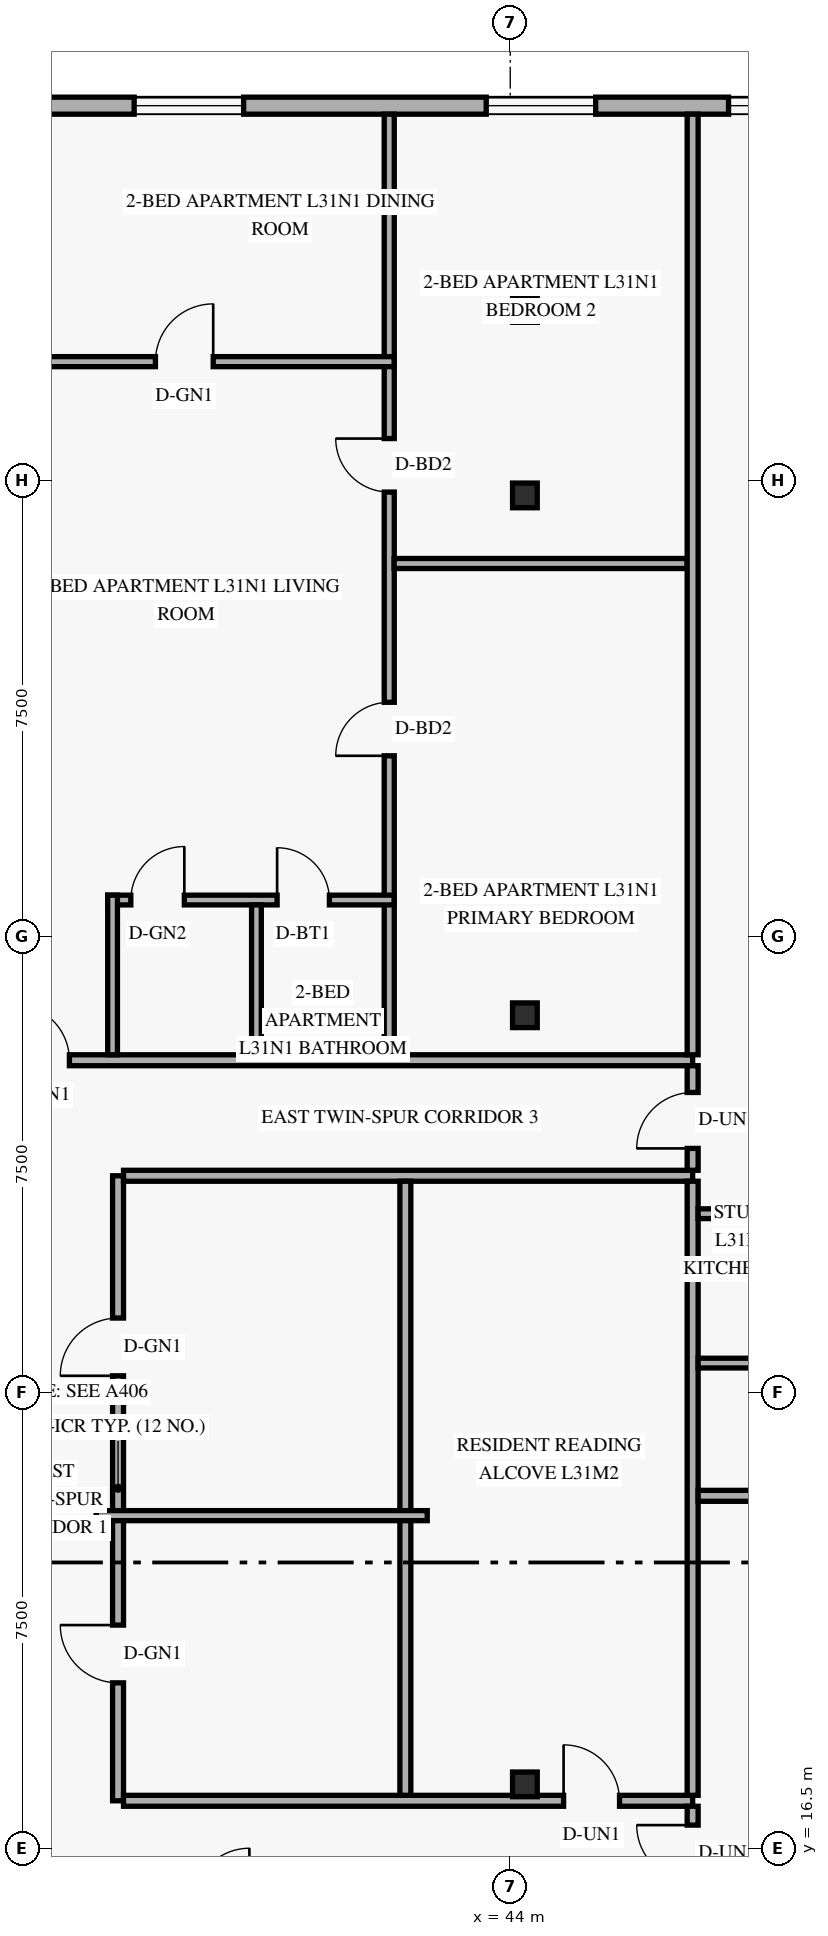
"""IFC4 building model, lengths in metres.
Left out: names, types, materials, properties, quantities, classifications, styles, units other than length and angle.
Written with IfcOpenShell. Run it as: python <this file> out.ifc"""

import sys

from ifc_helpers import new_model, si_unit, direction, frame, frame_2d, origin, origin_2d, place, context, subcontext, project, spatial, rectangle, hollow_rectangle, extrude, element, fill, save


model = new_model("IFC4")
c1 = context("Model", 3, precision=1e-05, world=origin(), true_north=direction((0.0, 1.0)))
c2 = subcontext(c1, "Body", "Model", "MODEL_VIEW")
j1 = project(units=[si_unit("LENGTHUNIT", "METRE"), si_unit("PLANEANGLEUNIT", "RADIAN")], contexts=[c1])
p1 = place(None, origin())
s1 = spatial("IfcSite", under=j1, at=p1, CompositionType="ELEMENT")
p2 = place(p1, origin())
s2 = spatial("IfcBuilding", under=s1, at=p2, CompositionType="ELEMENT")
p3 = place(p2, frame((0.0, 0.0, 121.2)))
s3 = spatial("IfcBuildingStorey", under=s2, at=p3, CompositionType="ELEMENT", Elevation=121.2)
for number, where, z_axis, x_axis in (
    (1, (44.178, 17.55, 0.0), (0.035, 0.0, 0.999), (0.0, 1.0, 0.0)),
    (2, (44.178, 30.2, 0.0), (0.035, 0.0, 0.999), (0.0, 1.0, 0.0)),
    (3, (44.178, 38.75, 0.0), (0.035, 0.0, 0.999), (0.0, 1.0, 0.0)),
    (4, (44.178, 41.8, 0.0), (0.035, 0.0, 0.999), (0.0, 1.0, 0.0)),
):
    element("IfcColumn", number, at=place(p3, frame(where, z_axis=z_axis, x_axis=x_axis)), inside=s3, PredefinedType="COLUMN", context=c2, shape_type="SweptSolid", body=[
        extrude(hollow_rectangle(XDim=0.406, YDim=0.406, WallThickness=0.016, at=origin_2d()), origin(), (0.0, 0.0, 1.0), 3.602),
    ])
p4 = place(p3, frame((49.98, 45.16, 0.0), z_axis=(0.0, 0.0, 1.0), x_axis=(-1.0, 0.0, 0.0)))
e5 = element("IfcWall", 5, at=p4, inside=s3, PredefinedType="SOLIDWALL", context=c2, shape_type="SweptSolid", body=[
    extrude(rectangle(XDim=36.56, YDim=0.28, at=frame_2d((18.28, 0.0))), origin(), (0.0, 0.0, 1.0), 3.36),
])
p5 = place(p4, frame((31.545, 0.0, 0.85)))
e6 = element("IfcOpeningElement", 6, at=p5, cuts=e5, PredefinedType="OPENING", context=c2, shape_type="SweptSolid", body=[
    extrude(rectangle(XDim=1.8, YDim=1.6, at=frame_2d((0.9, 0.8))), frame((0.0, 0.15, 0.0), z_axis=(0.0, -1.0, 0.0), x_axis=(1.0, 0.0, 0.0)), (0.0, 0.0, 1.0), 0.3),
])
p6 = place(p4, frame((23.48, 0.0, 0.85)))
e7 = element("IfcOpeningElement", 7, at=p6, cuts=e5, PredefinedType="OPENING", context=c2, shape_type="SweptSolid", body=[
    extrude(rectangle(XDim=1.8, YDim=1.6, at=frame_2d((0.9, 0.8))), frame((0.0, 0.15, 0.0), z_axis=(0.0, -1.0, 0.0), x_axis=(1.0, 0.0, 0.0)), (0.0, 0.0, 1.0), 0.3),
])
p7 = place(p4, frame((16.595, 0.0, 0.85)))
e8 = element("IfcOpeningElement", 8, at=p7, cuts=e5, PredefinedType="OPENING", context=c2, shape_type="SweptSolid", body=[
    extrude(rectangle(XDim=1.8, YDim=1.6, at=frame_2d((0.9, 0.8))), frame((0.0, 0.15, 0.0), z_axis=(0.0, -1.0, 0.0), x_axis=(1.0, 0.0, 0.0)), (0.0, 0.0, 1.0), 0.3),
])
p8 = place(p4, frame((10.365, 0.0, 0.85)))
e9 = element("IfcOpeningElement", 9, at=p8, cuts=e5, PredefinedType="OPENING", context=c2, shape_type="SweptSolid", body=[
    extrude(rectangle(XDim=1.8, YDim=1.6, at=frame_2d((0.9, 0.8))), frame((0.0, 0.15, 0.0), z_axis=(0.0, -1.0, 0.0), x_axis=(1.0, 0.0, 0.0)), (0.0, 0.0, 1.0), 0.3),
])
p9 = place(p4, frame((4.575, 0.0, 0.85)))
e10 = element("IfcOpeningElement", 10, at=p9, cuts=e5, PredefinedType="OPENING", context=c2, shape_type="SweptSolid", body=[
    extrude(rectangle(XDim=1.8, YDim=1.6, at=frame_2d((0.9, 0.8))), frame((0.0, 0.15, 0.0), z_axis=(0.0, -1.0, 0.0), x_axis=(1.0, 0.0, 0.0)), (0.0, 0.0, 1.0), 0.3),
])
p10 = place(p4, frame((0.59, 0.0, 0.85)))
e11 = element("IfcOpeningElement", 11, at=p10, cuts=e5, PredefinedType="OPENING", context=c2, shape_type="SweptSolid", body=[
    extrude(rectangle(XDim=1.8, YDim=1.6, at=frame_2d((0.9, 0.8))), frame((0.0, 0.15, 0.0), z_axis=(0.0, -1.0, 0.0), x_axis=(1.0, 0.0, 0.0)), (0.0, 0.0, 1.0), 0.3),
])
p11 = place(p3, frame((37.55, 17.28, 0.0), z_axis=(0.0, 0.0, 1.0), x_axis=(0.0, 1.0, 0.0)))
e12 = element("IfcWall", 12, at=p11, inside=s3, PredefinedType="STANDARD", context=c2, shape_type="SweptSolid", body=[
    extrude(rectangle(XDim=10.28, YDim=0.18, at=frame_2d((5.14, 0.0))), origin(), (0.0, 0.0, 1.0), 2.731),
])
p12 = place(p11, frame((1.94, 0.0, 0.0)))
e13 = element("IfcOpeningElement", 13, at=p12, cuts=e12, PredefinedType="OPENING", context=c2, shape_type="SweptSolid", body=[
    extrude(rectangle(XDim=0.95, YDim=2.15, at=frame_2d((0.475, 1.075))), frame((0.0, 0.1, 0.0), z_axis=(0.0, -1.0, 0.0), x_axis=(1.0, 0.0, 0.0)), (0.0, 0.0, 1.0), 0.2),
])
p13 = place(p11, frame((6.99, 0.0, 0.0)))
e14 = element("IfcOpeningElement", 14, at=p13, cuts=e12, PredefinedType="OPENING", context=c2, shape_type="SweptSolid", body=[
    extrude(rectangle(XDim=0.95, YDim=2.15, at=frame_2d((0.475, 1.075))), frame((0.0, 0.1, 0.0), z_axis=(0.0, -1.0, 0.0), x_axis=(1.0, 0.0, 0.0)), (0.0, 0.0, 1.0), 0.2),
])
p14 = place(p3, frame((37.64, 17.28, 0.0), z_axis=(0.0, 0.0, 1.0), x_axis=(1.0, 0.0, 0.0)))
e15 = element("IfcWall", 15, at=p14, inside=s3, PredefinedType="STANDARD", context=c2, shape_type="SweptSolid", body=[
    extrude(rectangle(XDim=9.36, YDim=0.18, at=frame_2d((4.68, 0.0))), origin(), (0.0, 0.0, 1.0), 2.731),
])
p15 = place(p14, frame((7.238, 0.0, 0.0)))
e16 = element("IfcOpeningElement", 16, at=p15, cuts=e15, PredefinedType="OPENING", context=c2, shape_type="SweptSolid", body=[
    extrude(rectangle(XDim=0.92, YDim=2.15, at=frame_2d((0.46, 1.075))), frame((0.0, 0.1, 0.0), z_axis=(0.0, -1.0, 0.0), x_axis=(1.0, 0.0, 0.0)), (0.0, 0.0, 1.0), 0.2),
])
p16 = place(p3, frame((37.64, 27.56, 0.0), z_axis=(0.0, 0.0, 1.0), x_axis=(1.0, 0.0, 0.0)))
e17 = element("IfcWall", 17, at=p16, inside=s3, PredefinedType="STANDARD", context=c2, shape_type="SweptSolid", body=[
    extrude(rectangle(XDim=9.36, YDim=0.18, at=frame_2d((4.68, 0.0))), origin(), (0.0, 0.0, 1.0), 2.731),
])
p17 = place(p3, frame((35.51, 29.46, 0.0), z_axis=(0.0, 0.0, 1.0), x_axis=(1.0, 0.0, 0.0)))
e18 = element("IfcWall", 18, at=p17, inside=s3, PredefinedType="STANDARD", context=c2, shape_type="SweptSolid", body=[
    extrude(rectangle(XDim=11.49, YDim=0.18, at=frame_2d((5.745, 0.0))), origin(), (0.0, 0.0, 1.0), 2.731),
])
p18 = place(p17, frame((0.32, 0.0, 0.0)))
e19 = element("IfcOpeningElement", 19, at=p18, cuts=e18, PredefinedType="OPENING", context=c2, shape_type="SweptSolid", body=[
    extrude(rectangle(XDim=0.92, YDim=2.15, at=frame_2d((0.46, 1.075))), frame((0.0, 0.1, 0.0), z_axis=(0.0, -1.0, 0.0), x_axis=(1.0, 0.0, 0.0)), (0.0, 0.0, 1.0), 0.2),
])
p19 = place(p3, frame((42.01, 29.55, 0.0), z_axis=(0.0, 0.0, 1.0), x_axis=(0.0, 1.0, 0.0)))
e20 = element("IfcWall", 20, at=p19, inside=s3, PredefinedType="PARTITIONING", context=c2, shape_type="SweptSolid", body=[
    extrude(rectangle(XDim=15.47, YDim=0.165, at=frame_2d((7.735, 0.0))), origin(), (0.0, 0.0, 1.0), 2.731),
])
p20 = place(p19, frame((4.917, 0.0, 0.0)))
e21 = element("IfcOpeningElement", 21, at=p20, cuts=e20, PredefinedType="OPENING", context=c2, shape_type="SweptSolid", body=[
    extrude(rectangle(XDim=0.88, YDim=2.14, at=frame_2d((0.44, 1.07))), frame((0.0, 0.093, 0.0), z_axis=(0.0, -1.0, 0.0), x_axis=(1.0, 0.0, 0.0)), (0.0, 0.0, 1.0), 0.185),
])
p21 = place(p19, frame((9.255, 0.0, 0.0)))
e22 = element("IfcOpeningElement", 22, at=p21, cuts=e20, PredefinedType="OPENING", context=c2, shape_type="SweptSolid", body=[
    extrude(rectangle(XDim=0.88, YDim=2.14, at=frame_2d((0.44, 1.07))), frame((0.0, 0.093, 0.0), z_axis=(0.0, -1.0, 0.0), x_axis=(1.0, 0.0, 0.0)), (0.0, 0.0, 1.0), 0.185),
])
p22 = place(p3, frame((37.38, 32.095, 0.0), z_axis=(0.0, 0.0, 1.0), x_axis=(1.0, 0.0, 0.0)))
e23 = element("IfcWall", 23, at=p22, inside=s3, PredefinedType="PLUMBINGWALL", context=c2, shape_type="SweptSolid", body=[
    extrude(rectangle(XDim=4.71, YDim=0.16, at=frame_2d((2.355, 0.0))), origin(), (0.0, 0.0, 1.0), 3.36),
])
p23 = place(p22, frame((0.38, 0.0, 0.0)))
e24 = element("IfcOpeningElement", 24, at=p23, cuts=e23, PredefinedType="OPENING", context=c2, shape_type="SweptSolid", body=[
    extrude(rectangle(XDim=0.88, YDim=2.12, at=frame_2d((0.44, 1.06))), frame((0.0, 0.09, 0.0), z_axis=(0.0, -1.0, 0.0), x_axis=(1.0, 0.0, 0.0)), (0.0, 0.0, 1.0), 0.18),
])
p24 = place(p22, frame((2.786, 0.0, 0.0)))
e25 = element("IfcOpeningElement", 25, at=p24, cuts=e23, PredefinedType="OPENING", context=c2, shape_type="SweptSolid", body=[
    extrude(rectangle(XDim=0.86, YDim=2.12, at=frame_2d((0.43, 1.06))), frame((0.0, 0.09, 0.0), z_axis=(0.0, -1.0, 0.0), x_axis=(1.0, 0.0, 0.0)), (0.0, 0.0, 1.0), 0.18),
])
p25 = place(p3, frame((37.46, 29.55, 0.0), z_axis=(0.0, 0.0, 1.0), x_axis=(0.0, 1.0, 0.0)))
e26 = element("IfcWall", 26, at=p25, inside=s3, PredefinedType="PLUMBINGWALL", context=c2, shape_type="SweptSolid", body=[
    extrude(rectangle(XDim=2.625, YDim=0.16, at=frame_2d((1.312, 0.0))), origin(), (0.0, 0.0, 1.0), 2.731),
])
p26 = place(p3, frame((39.826, 29.55, 0.0), z_axis=(0.0, 0.0, 1.0), x_axis=(0.0, 1.0, 0.0)))
e27 = element("IfcWall", 27, at=p26, inside=s3, PredefinedType="PLUMBINGWALL", context=c2, shape_type="SweptSolid", body=[
    extrude(rectangle(XDim=2.465, YDim=0.16, at=frame_2d((1.232, 0.0))), origin(), (0.0, 0.0, 1.0), 2.731),
])
p27 = place(p3, frame((35.51, 40.95, 0.0), z_axis=(0.0, 0.0, 1.0), x_axis=(1.0, 0.0, 0.0)))
e28 = element("IfcWall", 28, at=p27, inside=s3, PredefinedType="PARTITIONING", context=c2, shape_type="SweptSolid", body=[
    extrude(rectangle(XDim=6.58, YDim=0.165, at=frame_2d((3.29, 0.0))), origin(), (0.0, 0.0, 1.0), 3.36),
])
p28 = place(p27, frame((2.655, 0.0, 0.0)))
e29 = element("IfcOpeningElement", 29, at=p28, cuts=e28, PredefinedType="OPENING", context=c2, shape_type="SweptSolid", body=[
    extrude(rectangle(XDim=0.95, YDim=2.15, at=frame_2d((0.475, 1.075))), frame((0.0, 0.093, 0.0), z_axis=(0.0, -1.0, 0.0), x_axis=(1.0, 0.0, 0.0)), (0.0, 0.0, 1.0), 0.185),
])
p29 = place(p3, frame((42.09, 37.63, 0.0), z_axis=(0.0, 0.0, 1.0), x_axis=(1.0, 0.0, 0.0)))
e30 = element("IfcWall", 30, at=p29, inside=s3, PredefinedType="PARTITIONING", context=c2, shape_type="SweptSolid", body=[
    extrude(rectangle(XDim=4.82, YDim=0.165, at=frame_2d((2.41, 0.0))), origin(), (0.0, 0.0, 1.0), 2.731),
])
p30 = place(p3, frame((42.275, 17.37, 0.0), z_axis=(0.0, 0.0, 1.0), x_axis=(0.0, 1.0, 0.0)))
e31 = element("IfcWall", 31, at=p30, inside=s3, PredefinedType="PARTITIONING", context=c2, shape_type="SweptSolid", body=[
    extrude(rectangle(XDim=10.1, YDim=0.18, at=frame_2d((5.05, 0.0))), origin(), (0.0, 0.0, 1.0), 2.731),
])
p31 = place(p3, frame((37.19, 21.97, 0.0), z_axis=(0.0, 0.0, 1.0), x_axis=(1.0, 0.0, 0.0)))
e32 = element("IfcWall", 32, at=p31, inside=s3, PredefinedType="PARTITIONING", context=c2, shape_type="SweptSolid", body=[
    extrude(rectangle(XDim=5.445, YDim=0.165, at=frame_2d((2.723, 0.0))), origin(), (0.0, 0.0, 1.0), 3.36),
])
p32 = place(p3, frame((47.0, 15.67, 0.0), z_axis=(0.0, 0.0, 1.0), x_axis=(0.0, 1.0, 0.0)))
e33 = element("IfcWall", 33, at=p32, inside=s3, PredefinedType="STANDARD", context=c2, shape_type="SweptSolid", body=[
    extrude(rectangle(XDim=1.52, YDim=0.18, at=frame_2d((0.76, 0.0))), origin(), (0.0, 0.0, 1.0), 3.36),
])
p33 = place(p32, frame((0.29, 0.0, 0.0)))
e34 = element("IfcOpeningElement", 34, at=p33, cuts=e33, PredefinedType="OPENING", context=c2, shape_type="SweptSolid", body=[
    extrude(rectangle(XDim=0.92, YDim=2.15, at=frame_2d((0.46, 1.075))), frame((0.0, 0.1, 0.0), z_axis=(0.0, -1.0, 0.0), x_axis=(1.0, 0.0, 0.0)), (0.0, 0.0, 1.0), 0.2),
])
p34 = place(p3, frame((47.0, 27.65, 0.0), z_axis=(0.0, 0.0, 1.0), x_axis=(0.0, 1.0, 0.0)))
e35 = element("IfcWall", 35, at=p34, inside=s3, PredefinedType="STANDARD", context=c2, shape_type="SweptSolid", body=[
    extrude(rectangle(XDim=1.72, YDim=0.18, at=frame_2d((0.86, 0.0))), origin(), (0.0, 0.0, 1.0), 3.36),
])
p35 = place(p34, frame((0.36, 0.0, 0.0)))
e36 = element("IfcOpeningElement", 36, at=p35, cuts=e35, PredefinedType="OPENING", context=c2, shape_type="SweptSolid", body=[
    extrude(rectangle(XDim=0.92, YDim=2.15, at=frame_2d((0.46, 1.075))), frame((0.0, 0.1, 0.0), z_axis=(0.0, -1.0, 0.0), x_axis=(1.0, 0.0, 0.0)), (0.0, 0.0, 1.0), 0.2),
])
p36 = place(p3, frame((47.0, 17.37, 0.0), z_axis=(0.0, 0.0, 1.0), x_axis=(0.0, 1.0, 0.0)))
e37 = element("IfcWall", 37, at=p36, inside=s3, PredefinedType="PARTITIONING", context=c2, shape_type="SweptSolid", body=[
    extrude(rectangle(XDim=10.1, YDim=0.18, at=frame_2d((5.05, 0.0))), origin(), (0.0, 0.0, 1.0), 2.731),
])
p37 = place(p3, frame((47.0, 29.55, 0.0), z_axis=(0.0, 0.0, 1.0), x_axis=(0.0, 1.0, 0.0)))
e38 = element("IfcWall", 38, at=p37, inside=s3, PredefinedType="PARTITIONING", context=c2, shape_type="SweptSolid", body=[
    extrude(rectangle(XDim=15.47, YDim=0.18, at=frame_2d((7.735, 0.0))), origin(), (0.0, 0.0, 1.0), 2.731),
])
p38 = place(p3, frame((47.09, 22.296, 0.0), z_axis=(0.0, 0.0, 1.0), x_axis=(1.0, 0.0, 0.0)))
e39 = element("IfcWall", 39, at=p38, inside=s3, PredefinedType="PARTITIONING", context=c2, shape_type="SweptSolid", body=[
    extrude(rectangle(XDim=6.23, YDim=0.18, at=frame_2d((3.115, 0.0))), origin(), (0.0, 0.0, 1.0), 2.809),
])
p39 = place(p3, frame((47.09, 26.936, 0.0), z_axis=(0.0, 0.0, 1.0), x_axis=(1.0, 0.0, 0.0)))
e40 = element("IfcWall", 40, at=p39, inside=s3, PredefinedType="PLUMBINGWALL", context=c2, shape_type="SweptSolid", body=[
    extrude(rectangle(XDim=2.606, YDim=0.16, at=frame_2d((1.303, 0.0))), origin(), (0.0, 0.0, 1.0), 3.36),
])
p40 = place(p3, frame((47.09, 24.479, 0.0), z_axis=(0.0, 0.0, 1.0), x_axis=(1.0, 0.0, 0.0)))
e41 = element("IfcWall", 41, at=p40, inside=s3, PredefinedType="PLUMBINGWALL", context=c2, shape_type="SweptSolid", body=[
    extrude(rectangle(XDim=2.446, YDim=0.16, at=frame_2d((1.223, 0.0))), origin(), (0.0, 0.0, 1.0), 3.36),
])
p41 = place(p8, origin())
e42 = element("IfcWindow", 42, at=p41, inside=s3, PartitioningType="SINGLE_PANEL", PredefinedType="WINDOW", context=c2, shape_type="SweptSolid", body=[
    extrude(rectangle(XDim=1.8, YDim=1.6, at=frame_2d((0.9, 0.8))), frame((0.0, 0.03, 0.0), z_axis=(0.0, -1.0, 0.0), x_axis=(1.0, 0.0, 0.0)), (0.0, 0.0, 1.0), 0.06),
])
fill(e9, e42)
p42 = place(p9, origin())
e43 = element("IfcWindow", 43, at=p42, inside=s3, PartitioningType="SINGLE_PANEL", PredefinedType="WINDOW", context=c2, shape_type="SweptSolid", body=[
    extrude(rectangle(XDim=1.8, YDim=1.6, at=frame_2d((0.9, 0.8))), frame((0.0, 0.03, 0.0), z_axis=(0.0, -1.0, 0.0), x_axis=(1.0, 0.0, 0.0)), (0.0, 0.0, 1.0), 0.06),
])
fill(e10, e43)
p43 = place(p10, origin())
e44 = element("IfcWindow", 44, at=p43, inside=s3, PartitioningType="SINGLE_PANEL", PredefinedType="WINDOW", context=c2, shape_type="SweptSolid", body=[
    extrude(rectangle(XDim=1.8, YDim=1.6, at=frame_2d((0.9, 0.8))), frame((0.0, 0.03, 0.0), z_axis=(0.0, -1.0, 0.0), x_axis=(1.0, 0.0, 0.0)), (0.0, 0.0, 1.0), 0.06),
])
fill(e11, e44)
p44 = place(p28, origin())
e45 = element("IfcDoor", 45, at=p44, inside=s3, OperationType="SINGLE_SWING_RIGHT", PredefinedType="DOOR", context=c2, shape_type="SweptSolid", body=[
    extrude(rectangle(XDim=0.95, YDim=2.15, at=frame_2d((0.475, 1.075))), frame((0.0, 0.025, 0.0), z_axis=(0.0, -1.0, 0.0), x_axis=(1.0, 0.0, 0.0)), (0.0, 0.0, 1.0), 0.05),
])
fill(e29, e45)
p45 = place(p18, origin())
e46 = element("IfcDoor", 46, at=p45, inside=s3, OperationType="SINGLE_SWING_LEFT", PredefinedType="DOOR", context=c2, shape_type="SweptSolid", body=[
    extrude(rectangle(XDim=0.92, YDim=2.15, at=frame_2d((0.46, 1.075))), frame((0.0, 0.025, 0.0), z_axis=(0.0, -1.0, 0.0), x_axis=(1.0, 0.0, 0.0)), (0.0, 0.0, 1.0), 0.05),
])
fill(e19, e46)
p46 = place(p23, origin())
e47 = element("IfcDoor", 47, at=p46, inside=s3, OperationType="SINGLE_SWING_RIGHT", PredefinedType="DOOR", context=c2, shape_type="SweptSolid", body=[
    extrude(rectangle(XDim=0.88, YDim=2.12, at=frame_2d((0.44, 1.06))), frame((0.0, 0.025, 0.0), z_axis=(0.0, -1.0, 0.0), x_axis=(1.0, 0.0, 0.0)), (0.0, 0.0, 1.0), 0.05),
])
fill(e24, e47)
p47 = place(p24, origin())
e48 = element("IfcDoor", 48, at=p47, inside=s3, OperationType="SINGLE_SWING_LEFT", PredefinedType="DOOR", context=c2, shape_type="SweptSolid", body=[
    extrude(rectangle(XDim=0.86, YDim=2.12, at=frame_2d((0.43, 1.06))), frame((0.0, 0.025, 0.0), z_axis=(0.0, -1.0, 0.0), x_axis=(1.0, 0.0, 0.0)), (0.0, 0.0, 1.0), 0.05),
])
fill(e25, e48)
p48 = place(p20, origin())
e49 = element("IfcDoor", 49, at=p48, inside=s3, OperationType="SINGLE_SWING_LEFT", PredefinedType="DOOR", context=c2, shape_type="SweptSolid", body=[
    extrude(rectangle(XDim=0.88, YDim=2.14, at=frame_2d((0.44, 1.07))), frame((0.0, 0.025, 0.0), z_axis=(0.0, -1.0, 0.0), x_axis=(1.0, 0.0, 0.0)), (0.0, 0.0, 1.0), 0.05),
])
fill(e21, e49)
p49 = place(p21, origin())
e50 = element("IfcDoor", 50, at=p49, inside=s3, OperationType="SINGLE_SWING_RIGHT", PredefinedType="DOOR", context=c2, shape_type="SweptSolid", body=[
    extrude(rectangle(XDim=0.88, YDim=2.14, at=frame_2d((0.44, 1.07))), frame((0.0, 0.025, 0.0), z_axis=(0.0, -1.0, 0.0), x_axis=(1.0, 0.0, 0.0)), (0.0, 0.0, 1.0), 0.05),
])
fill(e22, e50)
p50 = place(p12, origin())
e51 = element("IfcDoor", 51, at=p50, inside=s3, OperationType="SINGLE_SWING_RIGHT", PredefinedType="DOOR", context=c2, shape_type="SweptSolid", body=[
    extrude(rectangle(XDim=0.95, YDim=2.15, at=frame_2d((0.475, 1.075))), frame((0.0, 0.025, 0.0), z_axis=(0.0, -1.0, 0.0), x_axis=(1.0, 0.0, 0.0)), (0.0, 0.0, 1.0), 0.05),
])
fill(e13, e51)
p51 = place(p13, origin())
e52 = element("IfcDoor", 52, at=p51, inside=s3, OperationType="SINGLE_SWING_LEFT", PredefinedType="DOOR", context=c2, shape_type="SweptSolid", body=[
    extrude(rectangle(XDim=0.95, YDim=2.15, at=frame_2d((0.475, 1.075))), frame((0.0, 0.025, 0.0), z_axis=(0.0, -1.0, 0.0), x_axis=(1.0, 0.0, 0.0)), (0.0, 0.0, 1.0), 0.05),
])
fill(e14, e52)
p52 = place(p15, origin())
e53 = element("IfcDoor", 53, at=p52, inside=s3, OperationType="SINGLE_SWING_LEFT", PredefinedType="DOOR", context=c2, shape_type="SweptSolid", body=[
    extrude(rectangle(XDim=0.92, YDim=2.15, at=frame_2d((0.46, 1.075))), frame((0.0, 0.025, 0.0), z_axis=(0.0, -1.0, 0.0), x_axis=(1.0, 0.0, 0.0)), (0.0, 0.0, 1.0), 0.05),
])
fill(e16, e53)
p53 = place(p33, origin())
e54 = element("IfcDoor", 54, at=p53, inside=s3, OperationType="SINGLE_SWING_RIGHT", PredefinedType="DOOR", context=c2, shape_type="SweptSolid", body=[
    extrude(rectangle(XDim=0.92, YDim=2.15, at=frame_2d((0.46, 1.075))), frame((0.0, 0.025, 0.0), z_axis=(0.0, -1.0, 0.0), x_axis=(1.0, 0.0, 0.0)), (0.0, 0.0, 1.0), 0.05),
])
fill(e34, e54)
p54 = place(p35, origin())
e55 = element("IfcDoor", 55, at=p54, inside=s3, OperationType="SINGLE_SWING_LEFT", PredefinedType="DOOR", context=c2, shape_type="SweptSolid", body=[
    extrude(rectangle(XDim=0.92, YDim=2.15, at=frame_2d((0.46, 1.075))), frame((0.0, 0.025, 0.0), z_axis=(0.0, -1.0, 0.0), x_axis=(1.0, 0.0, 0.0)), (0.0, 0.0, 1.0), 0.05),
])
fill(e36, e55)
save(model, sys.argv[1])
